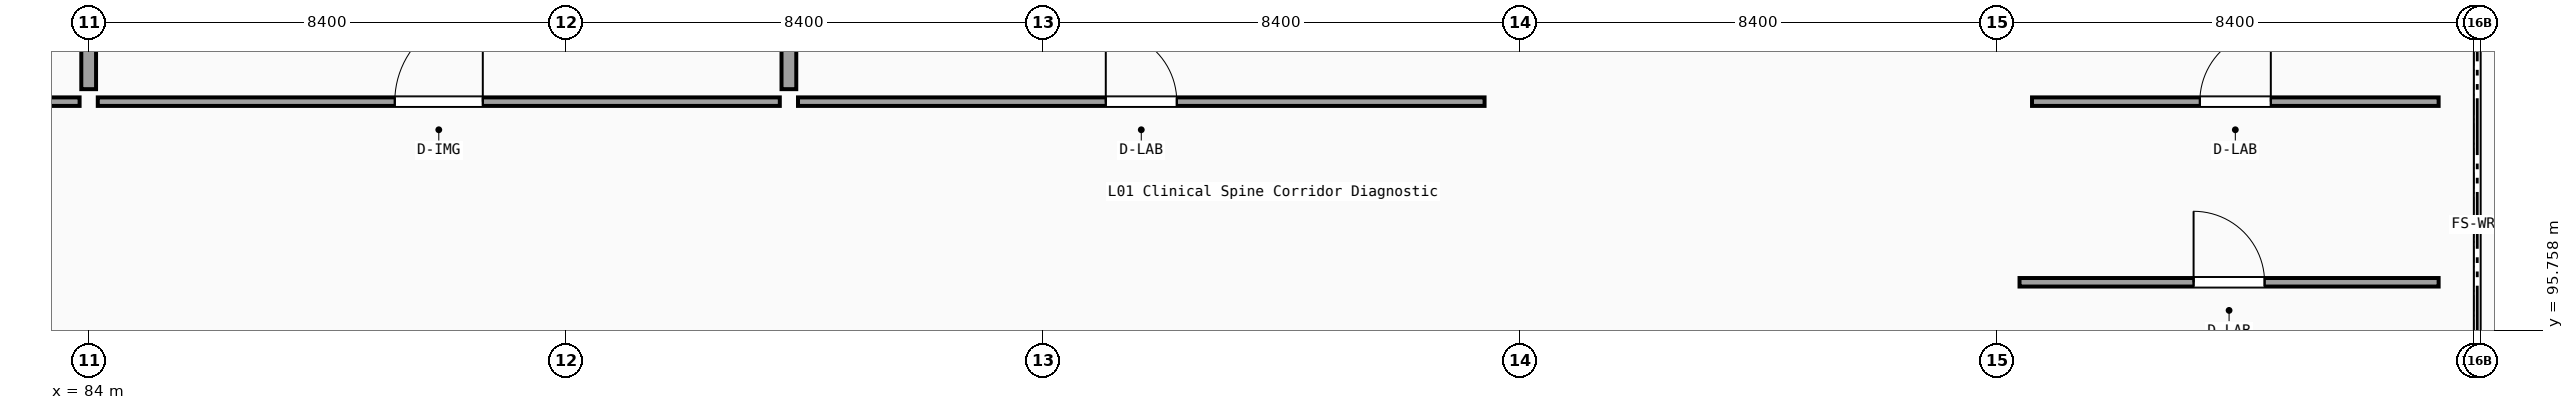
"""IFC4 building model, lengths in metres.
Left out: names, types, materials, properties, quantities, classifications, styles, units other than length and angle.
Written with IfcOpenShell. Run it as: python <this file> out.ifc"""

import sys

from ifc_helpers import new_model, si_unit, direction, frame, frame_2d, origin, place, context, subcontext, project, spatial, rectangle, extrude, element, fill, save


model = new_model("IFC4")
c1 = context("Model", 3, precision=1e-05, world=origin(), true_north=direction((0.0, 1.0)))
c2 = subcontext(c1, "Body", "Model", "MODEL_VIEW")
j1 = project(units=[si_unit("LENGTHUNIT", "METRE"), si_unit("PLANEANGLEUNIT", "RADIAN")], contexts=[c1])
p1 = place(None, origin())
s1 = spatial("IfcSite", under=j1, at=p1, CompositionType="ELEMENT")
p2 = place(p1, origin())
s2 = spatial("IfcBuilding", under=s1, at=p2, CompositionType="ELEMENT")
p3 = place(p2, frame((0.0, 0.0, 5.1)))
s3 = spatial("IfcBuildingStorey", under=s2, at=p3, CompositionType="ELEMENT", Elevation=5.1)
p4 = place(p3, frame((118.0, 96.61, 0.0), z_axis=(0.0, 0.0, 1.0), x_axis=(1.0, 0.0, 0.0)))
e1 = element("IfcWall", 1, at=p4, inside=s3, PredefinedType="PARTITIONING", context=c2, shape_type="SweptSolid", body=[
    extrude(rectangle(XDim=7.38, YDim=0.15, at=frame_2d((3.69, 0.0))), origin(), (0.0, 0.0, 1.0), 4.82),
])
p5 = place(p4, frame((3.065, 0.0, 0.0)))
e2 = element("IfcOpeningElement", 2, at=p5, cuts=e1, PredefinedType="OPENING", context=c2, shape_type="SweptSolid", body=[
    extrude(rectangle(XDim=1.25, YDim=2.2, at=frame_2d((0.625, 1.1))), frame((0.0, 0.085, 0.0), z_axis=(0.0, -1.0, 0.0), x_axis=(1.0, 0.0, 0.0)), (0.0, 0.0, 1.0), 0.17),
])
p6 = place(p3, frame((71.83, 99.79, 0.0), z_axis=(0.0, 0.0, 1.0), x_axis=(1.0, 0.0, 0.0)))
e3 = element("IfcWall", 3, at=p6, inside=s3, PredefinedType="PARTITIONING", context=c2, shape_type="SweptSolid", body=[
    extrude(rectangle(XDim=12.01, YDim=0.15, at=frame_2d((6.005, 0.0))), origin(), (0.0, 0.0, 1.0), 4.43),
])
p7 = place(p6, frame((5.23, 0.0, 0.0)))
e4 = element("IfcOpeningElement", 4, at=p7, cuts=e3, PredefinedType="OPENING", context=c2, shape_type="SweptSolid", body=[
    extrude(rectangle(XDim=1.55, YDim=2.25, at=frame_2d((0.775, 1.125))), frame((0.0, 0.085, 0.0), z_axis=(0.0, -1.0, 0.0), x_axis=(1.0, 0.0, 0.0)), (0.0, 0.0, 1.0), 0.17),
])
p8 = place(p3, frame((84.0, 100.01, 0.0), z_axis=(0.0, 0.0, 1.0), x_axis=(0.0, 1.0, 0.0)))
e5 = element("IfcWall", 5, at=p8, inside=s3, PredefinedType="PARTITIONING", context=c2, shape_type="SweptSolid", body=[
    extrude(rectangle(XDim=16.1, YDim=0.26, at=frame_2d((8.05, 0.0))), origin(), (0.0, 0.0, 1.0), 4.82),
])
p9 = place(p3, frame((84.16, 99.79, 0.0), z_axis=(0.0, 0.0, 1.0), x_axis=(1.0, 0.0, 0.0)))
e6 = element("IfcWall", 6, at=p9, inside=s3, PredefinedType="PARTITIONING", context=c2, shape_type="SweptSolid", body=[
    extrude(rectangle(XDim=12.01, YDim=0.15, at=frame_2d((6.005, 0.0))), origin(), (0.0, 0.0, 1.0), 4.82),
])
p10 = place(p9, frame((5.23, 0.0, 0.0)))
e7 = element("IfcOpeningElement", 7, at=p10, cuts=e6, PredefinedType="OPENING", context=c2, shape_type="SweptSolid", body=[
    extrude(rectangle(XDim=1.55, YDim=2.25, at=frame_2d((0.775, 1.125))), frame((0.0, 0.085, 0.0), z_axis=(0.0, -1.0, 0.0), x_axis=(1.0, 0.0, 0.0)), (0.0, 0.0, 1.0), 0.17),
])
p11 = place(p3, frame((96.33, 100.01, 0.0), z_axis=(0.0, 0.0, 1.0), x_axis=(0.0, 1.0, 0.0)))
e8 = element("IfcWall", 8, at=p11, inside=s3, PredefinedType="PARTITIONING", context=c2, shape_type="SweptSolid", body=[
    extrude(rectangle(XDim=16.1, YDim=0.26, at=frame_2d((8.05, 0.0))), origin(), (0.0, 0.0, 1.0), 4.82),
])
p12 = place(p3, frame((96.49, 99.79, 0.0), z_axis=(0.0, 0.0, 1.0), x_axis=(1.0, 0.0, 0.0)))
e9 = element("IfcWall", 9, at=p12, inside=s3, PredefinedType="PARTITIONING", context=c2, shape_type="SweptSolid", body=[
    extrude(rectangle(XDim=12.09, YDim=0.15, at=frame_2d((6.045, 0.0))), origin(), (0.0, 0.0, 1.0), 4.82),
])
p13 = place(p12, frame((5.42, 0.0, 0.0)))
e10 = element("IfcOpeningElement", 10, at=p13, cuts=e9, PredefinedType="OPENING", context=c2, shape_type="SweptSolid", body=[
    extrude(rectangle(XDim=1.25, YDim=2.2, at=frame_2d((0.625, 1.1))), frame((0.0, 0.085, 0.0), z_axis=(0.0, -1.0, 0.0), x_axis=(1.0, 0.0, 0.0)), (0.0, 0.0, 1.0), 0.17),
])
p14 = place(p3, frame((118.22, 99.79, 0.0), z_axis=(0.0, 0.0, 1.0), x_axis=(1.0, 0.0, 0.0)))
e11 = element("IfcWall", 11, at=p14, inside=s3, PredefinedType="PARTITIONING", context=c2, shape_type="SweptSolid", body=[
    extrude(rectangle(XDim=7.16, YDim=0.15, at=frame_2d((3.58, 0.0))), origin(), (0.0, 0.0, 1.0), 4.82),
])
p15 = place(p14, frame((2.955, 0.0, 0.0)))
e12 = element("IfcOpeningElement", 12, at=p15, cuts=e11, PredefinedType="OPENING", context=c2, shape_type="SweptSolid", body=[
    extrude(rectangle(XDim=1.25, YDim=2.2, at=frame_2d((0.625, 1.1))), frame((0.0, 0.085, 0.0), z_axis=(0.0, -1.0, 0.0), x_axis=(1.0, 0.0, 0.0)), (0.0, 0.0, 1.0), 0.17),
])
p16 = place(p5, origin())
e13 = element("IfcDoor", 13, at=p16, inside=s3, OperationType="SINGLE_SWING_LEFT", PredefinedType="DOOR", context=c2, shape_type="SweptSolid", body=[
    extrude(rectangle(XDim=1.25, YDim=2.2, at=frame_2d((0.625, 1.1))), frame((0.0, 0.025, 0.0), z_axis=(0.0, -1.0, 0.0), x_axis=(1.0, 0.0, 0.0)), (0.0, 0.0, 1.0), 0.05),
])
fill(e2, e13)
p17 = place(p10, origin())
e14 = element("IfcDoor", 14, at=p17, inside=s3, OperationType="SINGLE_SWING_RIGHT", PredefinedType="DOOR", context=c2, shape_type="SweptSolid", body=[
    extrude(rectangle(XDim=1.55, YDim=2.25, at=frame_2d((0.775, 1.125))), frame((0.0, 0.025, 0.0), z_axis=(0.0, -1.0, 0.0), x_axis=(1.0, 0.0, 0.0)), (0.0, 0.0, 1.0), 0.05),
])
fill(e7, e14)
p18 = place(p13, origin())
e15 = element("IfcDoor", 15, at=p18, inside=s3, OperationType="SINGLE_SWING_LEFT", PredefinedType="DOOR", context=c2, shape_type="SweptSolid", body=[
    extrude(rectangle(XDim=1.25, YDim=2.2, at=frame_2d((0.625, 1.1))), frame((0.0, 0.025, 0.0), z_axis=(0.0, -1.0, 0.0), x_axis=(1.0, 0.0, 0.0)), (0.0, 0.0, 1.0), 0.05),
])
fill(e10, e15)
p19 = place(p15, origin())
e16 = element("IfcDoor", 16, at=p19, inside=s3, OperationType="SINGLE_SWING_RIGHT", PredefinedType="DOOR", context=c2, shape_type="SweptSolid", body=[
    extrude(rectangle(XDim=1.25, YDim=2.2, at=frame_2d((0.625, 1.1))), frame((0.0, 0.025, 0.0), z_axis=(0.0, -1.0, 0.0), x_axis=(1.0, 0.0, 0.0)), (0.0, 0.0, 1.0), 0.05),
])
fill(e12, e16)
save(model, sys.argv[1])
